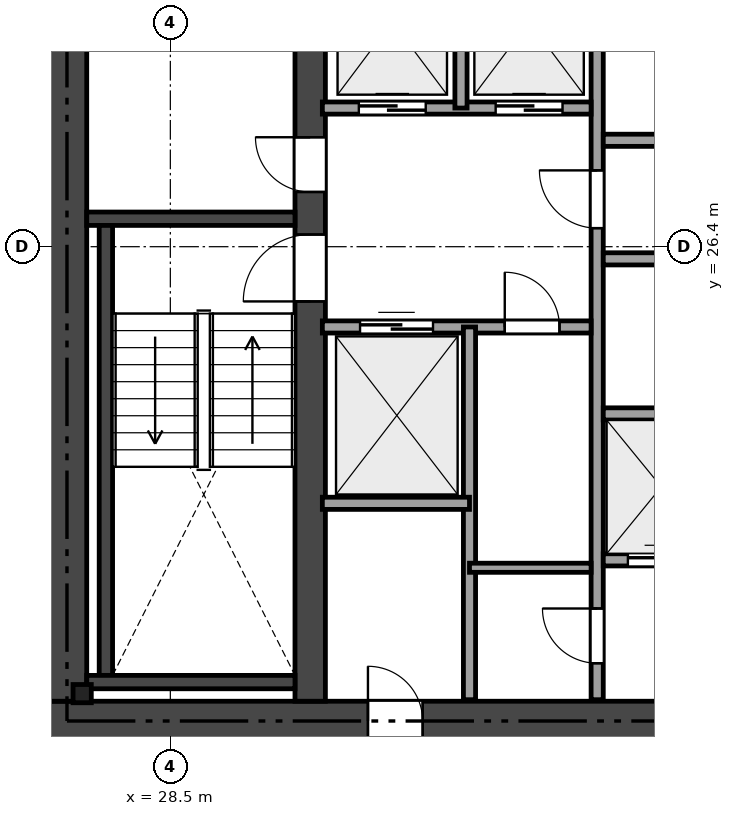
"""IFC4 building model, lengths in metres.
Left out: names, types, materials, properties, quantities, classifications, styles, units other than length and angle.
Written with IfcOpenShell. Run it as: python <this file> out.ifc"""

import sys

from ifc_helpers import new_model, si_unit, direction, frame, frame_2d, origin, origin_2d, place, context, subcontext, project, spatial, rectangle, i_section, extrude, element, fill, save


model = new_model("IFC4")
c1 = context("Model", 3, precision=1e-05, world=origin(), true_north=direction((0.0, 1.0)))
c2 = subcontext(c1, "Body", "Model", "MODEL_VIEW")
j1 = project(units=[si_unit("LENGTHUNIT", "METRE"), si_unit("PLANEANGLEUNIT", "RADIAN")], contexts=[c1])
p1 = place(None, origin())
s1 = spatial("IfcSite", under=j1, at=p1, CompositionType="ELEMENT")
p2 = place(p1, origin())
s2 = spatial("IfcBuilding", under=s1, at=p2, CompositionType="ELEMENT")
p3 = place(p2, frame((0.0, 0.0, 40.8)))
s3 = spatial("IfcBuildingStorey", under=s2, at=p3, CompositionType="ELEMENT", Elevation=40.8)
p4 = place(p3, frame((26.475, 18.6, 0.0), z_axis=(0.0, 0.0, 1.0), x_axis=(1.0, 0.0, 0.0)))
e1 = element("IfcWall", 1, at=p4, inside=s3, PredefinedType="SHEAR", context=c2, shape_type="SweptSolid", body=[
    extrude(rectangle(XDim=21.45, YDim=0.65, at=frame_2d((10.725, 0.0))), origin(), (0.0, 0.0, 1.0), 3.17),
])
p5 = place(p4, frame((12.45, 0.0, 0.0)))
e2 = element("IfcOpeningElement", 2, at=p5, cuts=e1, PredefinedType="OPENING", context=c2, shape_type="SweptSolid", body=[
    extrude(rectangle(XDim=1.15, YDim=2.15, at=frame_2d((0.575, 1.075))), frame((0.0, 0.335, 0.0), z_axis=(0.0, -1.0, 0.0), x_axis=(1.0, 0.0, 0.0)), (0.0, 0.0, 1.0), 0.67),
])
p6 = place(p4, frame((5.275, 0.0, 0.0)))
e3 = element("IfcOpeningElement", 3, at=p6, cuts=e1, PredefinedType="OPENING", context=c2, shape_type="SweptSolid", body=[
    extrude(rectangle(XDim=0.9, YDim=2.1, at=frame_2d((0.45, 1.05))), frame((0.0, 0.335, 0.0), z_axis=(0.0, -1.0, 0.0), x_axis=(1.0, 0.0, 0.0)), (0.0, 0.0, 1.0), 0.67),
])
p7 = place(p3, frame((26.8, 18.925, 0.0), z_axis=(0.0, 0.0, 1.0), x_axis=(0.0, 1.0, 0.0)))
e4 = element("IfcWall", 4, at=p7, inside=s3, PredefinedType="SHEAR", context=c2, shape_type="SweptSolid", body=[
    extrude(rectangle(XDim=14.95, YDim=0.65, at=frame_2d((7.475, 0.0))), origin(), (0.0, 0.0, 1.0), 3.17),
])
p8 = place(p3, frame((30.8, 18.925, 0.0), z_axis=(0.0, 0.0, 1.0), x_axis=(0.0, 1.0, 0.0)))
e5 = element("IfcWall", 5, at=p8, inside=s3, PredefinedType="SHEAR", context=c2, shape_type="SweptSolid", body=[
    extrude(rectangle(XDim=14.95, YDim=0.5, at=frame_2d((7.475, 0.0))), origin(), (0.0, 0.0, 1.0), 3.17),
])
p9 = place(p8, frame((6.575, 0.0, 0.0)))
e6 = element("IfcOpeningElement", 6, at=p9, cuts=e5, PredefinedType="OPENING", context=c2, shape_type="SweptSolid", body=[
    extrude(rectangle(XDim=1.1, YDim=2.15, at=frame_2d((0.55, 1.075))), frame((0.0, 0.26, 0.0), z_axis=(0.0, -1.0, 0.0), x_axis=(1.0, 0.0, 0.0)), (0.0, 0.0, 1.0), 0.52),
])
p10 = place(p8, frame((8.375, 0.0, 0.0)))
e7 = element("IfcOpeningElement", 7, at=p10, cuts=e5, PredefinedType="OPENING", context=c2, shape_type="SweptSolid", body=[
    extrude(rectangle(XDim=0.9, YDim=2.1, at=frame_2d((0.45, 1.05))), frame((0.0, 0.26, 0.0), z_axis=(0.0, -1.0, 0.0), x_axis=(1.0, 0.0, 0.0)), (0.0, 0.0, 1.0), 0.52),
])
p11 = place(p3, frame((27.125, 26.86, 0.0), z_axis=(0.0, 0.0, 1.0), x_axis=(1.0, 0.0, 0.0)))
e8 = element("IfcWall", 8, at=p11, inside=s3, PredefinedType="SHEAR", context=c2, shape_type="SweptSolid", body=[
    extrude(rectangle(XDim=3.425, YDim=0.22, at=frame_2d((1.712, 0.0))), origin(), (0.0, 0.0, 1.0), 3.17),
])
p12 = place(p3, frame((27.44, 19.35, 0.0), z_axis=(0.0, 0.0, 1.0), x_axis=(0.0, 1.0, 0.0)))
e9 = element("IfcWall", 9, at=p12, inside=s3, PredefinedType="SHEAR", context=c2, shape_type="SweptSolid", body=[
    extrude(rectangle(XDim=7.4, YDim=0.22, at=frame_2d((3.7, 0.0))), origin(), (0.0, 0.0, 1.0), 3.17),
])
p13 = place(p3, frame((27.125, 19.24, 0.0), z_axis=(0.0, 0.0, 1.0), x_axis=(1.0, 0.0, 0.0)))
e10 = element("IfcWall", 10, at=p13, inside=s3, PredefinedType="SHEAR", context=c2, shape_type="SweptSolid", body=[
    extrude(rectangle(XDim=3.425, YDim=0.22, at=frame_2d((1.712, 0.0))), origin(), (0.0, 0.0, 1.0), 3.17),
])
p14 = place(p3, frame((27.05, 19.05, 0.0), z_axis=(0.0, 0.0, 1.0), x_axis=(1.0, 0.0, 0.0)))
e11 = element("IfcColumn", 11, at=p14, inside=s3, PredefinedType="PILASTER", context=c2, shape_type="SweptSolid", body=[
    extrude(i_section(OverallWidth=0.3, OverallDepth=0.3, WebThickness=0.011, FlangeThickness=0.019, at=origin_2d()), origin(), (0.0, 0.0, 1.0), 3.17),
])
p15 = place(p3, frame((35.52, 18.95, 0.0), z_axis=(0.0, 0.0, 1.0), x_axis=(0.0, 1.0, 0.0)))
e12 = element("IfcWall", 12, at=p15, inside=s3, PredefinedType="SOLIDWALL", context=c2, shape_type="SweptSolid", body=[
    extrude(rectangle(XDim=14.9, YDim=0.2, at=frame_2d((7.45, 0.0))), origin(), (0.0, 0.0, 1.0), 2.691),
])
p16 = place(p15, frame((7.755, 0.0, 0.0)))
e13 = element("IfcOpeningElement", 13, at=p16, cuts=e12, PredefinedType="OPENING", context=c2, shape_type="SweptSolid", body=[
    extrude(rectangle(XDim=0.95, YDim=2.15, at=frame_2d((0.475, 1.075))), frame((0.0, 0.11, 0.0), z_axis=(0.0, -1.0, 0.0), x_axis=(1.0, 0.0, 0.0)), (0.0, 0.0, 1.0), 0.22),
])
p17 = place(p15, frame((0.6, 0.0, 0.0)))
e14 = element("IfcOpeningElement", 14, at=p17, cuts=e12, PredefinedType="OPENING", context=c2, shape_type="SweptSolid", body=[
    extrude(rectangle(XDim=0.9, YDim=2.1, at=frame_2d((0.45, 1.05))), frame((0.0, 0.11, 0.0), z_axis=(0.0, -1.0, 0.0), x_axis=(1.0, 0.0, 0.0)), (0.0, 0.0, 1.0), 0.22),
])
p18 = place(p3, frame((31.0, 28.68, 0.0), z_axis=(0.0, 0.0, 1.0), x_axis=(1.0, 0.0, 0.0)))
e15 = element("IfcWall", 15, at=p18, inside=s3, PredefinedType="SOLIDWALL", context=c2, shape_type="SweptSolid", body=[
    extrude(rectangle(XDim=4.42, YDim=0.2, at=frame_2d((2.21, 0.0))), origin(), (0.0, 0.0, 1.0), 3.17),
])
p19 = place(p18, frame((0.6, 0.0, 0.0)))
e16 = element("IfcOpeningElement", 16, at=p19, cuts=e15, PredefinedType="OPENING", context=c2, shape_type="SweptSolid", body=[
    extrude(rectangle(XDim=1.1, YDim=2.15, at=frame_2d((0.55, 1.075))), frame((0.0, 0.11, 0.0), z_axis=(0.0, -1.0, 0.0), x_axis=(1.0, 0.0, 0.0)), (0.0, 0.0, 1.0), 0.22),
])
p20 = place(p18, frame((2.85, 0.0, 0.0)))
e17 = element("IfcOpeningElement", 17, at=p20, cuts=e15, PredefinedType="OPENING", context=c2, shape_type="SweptSolid", body=[
    extrude(rectangle(XDim=1.1, YDim=2.15, at=frame_2d((0.55, 1.075))), frame((0.0, 0.11, 0.0), z_axis=(0.0, -1.0, 0.0), x_axis=(1.0, 0.0, 0.0)), (0.0, 0.0, 1.0), 0.22),
])
p21 = place(p3, frame((33.28, 28.68, 0.0), z_axis=(0.0, 0.0, 1.0), x_axis=(0.0, 1.0, 0.0)))
e18 = element("IfcWall", 18, at=p21, inside=s3, PredefinedType="SOLIDWALL", context=c2, shape_type="SweptSolid", body=[
    extrude(rectangle(XDim=2.82, YDim=0.2, at=frame_2d((1.41, 0.0))), origin(), (0.0, 0.0, 1.0), 3.17),
])
p22 = place(p3, frame((31.0, 25.08, 0.0), z_axis=(0.0, 0.0, 1.0), x_axis=(1.0, 0.0, 0.0)))
e19 = element("IfcWall", 19, at=p22, inside=s3, PredefinedType="SOLIDWALL", context=c2, shape_type="SweptSolid", body=[
    extrude(rectangle(XDim=4.42, YDim=0.2, at=frame_2d((2.21, 0.0))), origin(), (0.0, 0.0, 1.0), 3.17),
])
p23 = place(p22, frame((3.0, 0.0, 0.0)))
e20 = element("IfcOpeningElement", 20, at=p23, cuts=e19, PredefinedType="OPENING", context=c2, shape_type="SweptSolid", body=[
    extrude(rectangle(XDim=0.9, YDim=2.1, at=frame_2d((0.45, 1.05))), frame((0.0, 0.11, 0.0), z_axis=(0.0, -1.0, 0.0), x_axis=(1.0, 0.0, 0.0)), (0.0, 0.0, 1.0), 0.22),
])
p24 = place(p22, frame((0.62, 0.0, 0.0)))
e21 = element("IfcOpeningElement", 21, at=p24, cuts=e19, PredefinedType="OPENING", context=c2, shape_type="SweptSolid", body=[
    extrude(rectangle(XDim=1.2, YDim=2.15, at=frame_2d((0.6, 1.075))), frame((0.0, 0.11, 0.0), z_axis=(0.0, -1.0, 0.0), x_axis=(1.0, 0.0, 0.0)), (0.0, 0.0, 1.0), 0.22),
])
p25 = place(p3, frame((33.42, 18.95, 0.0), z_axis=(0.0, 0.0, 1.0), x_axis=(0.0, 1.0, 0.0)))
e22 = element("IfcWall", 22, at=p25, inside=s3, PredefinedType="SOLIDWALL", context=c2, shape_type="SweptSolid", body=[
    extrude(rectangle(XDim=6.13, YDim=0.2, at=frame_2d((3.065, 0.0))), origin(), (0.0, 0.0, 1.0), 2.691),
])
p26 = place(p3, frame((31.0, 22.18, 0.0), z_axis=(0.0, 0.0, 1.0), x_axis=(1.0, 0.0, 0.0)))
e23 = element("IfcWall", 23, at=p26, inside=s3, PredefinedType="SOLIDWALL", context=c2, shape_type="SweptSolid", body=[
    extrude(rectangle(XDim=2.42, YDim=0.2, at=frame_2d((1.21, 0.0))), origin(), (0.0, 0.0, 1.0), 3.17),
])
p27 = place(p3, frame((33.42, 21.12, 0.0), z_axis=(0.0, 0.0, 1.0), x_axis=(1.0, 0.0, 0.0)))
e24 = element("IfcWall", 24, at=p27, inside=s3, PredefinedType="PARTITIONING", context=c2, shape_type="SweptSolid", body=[
    extrude(rectangle(XDim=2.0, YDim=0.15, at=frame_2d((1.0, 0.0))), origin(), (0.0, 0.0, 1.0), 3.17),
])
for number, where, z_axis, x_axis in (
    (25, (35.62, 28.15, 0.0), (0.0, 0.0, 1.0), (1.0, 0.0, 0.0)),
    (26, (35.62, 26.2, 0.0), (0.0, 0.0, 1.0), (1.0, 0.0, 0.0)),
):
    element("IfcWall", number, at=place(p3, frame(where, z_axis=z_axis, x_axis=x_axis)), inside=s3, PredefinedType="SOLIDWALL", context=c2, shape_type="SweptSolid", body=[
        extrude(rectangle(XDim=7.88, YDim=0.2, at=frame_2d((3.94, 0.0))), origin(), (0.0, 0.0, 1.0), 3.17),
    ])
p28 = place(p3, frame((35.62, 23.65, 0.0), z_axis=(0.0, 0.0, 1.0), x_axis=(1.0, 0.0, 0.0)))
e27 = element("IfcWall", 27, at=p28, inside=s3, PredefinedType="SOLIDWALL", context=c2, shape_type="SweptSolid", body=[
    extrude(rectangle(XDim=7.88, YDim=0.2, at=frame_2d((3.94, 0.0))), origin(), (0.0, 0.0, 1.0), 2.691),
])
p29 = place(p3, frame((35.62, 21.25, 0.0), z_axis=(0.0, 0.0, 1.0), x_axis=(1.0, 0.0, 0.0)))
e28 = element("IfcWall", 28, at=p29, inside=s3, PredefinedType="SOLIDWALL", context=c2, shape_type="SweptSolid", body=[
    extrude(rectangle(XDim=7.88, YDim=0.2, at=frame_2d((3.94, 0.0))), origin(), (0.0, 0.0, 1.0), 3.17),
])
p30 = place(p29, frame((0.405, 0.0, 0.0)))
e29 = element("IfcOpeningElement", 29, at=p30, cuts=e28, PredefinedType="OPENING", context=c2, shape_type="SweptSolid", body=[
    extrude(rectangle(XDim=1.1, YDim=2.15, at=frame_2d((0.55, 1.075))), frame((0.0, 0.11, 0.0), z_axis=(0.0, -1.0, 0.0), x_axis=(1.0, 0.0, 0.0)), (0.0, 0.0, 1.0), 0.22),
])
p31 = place(p29, frame((2.355, 0.0, 0.0)))
e30 = element("IfcOpeningElement", 30, at=p31, cuts=e28, PredefinedType="OPENING", context=c2, shape_type="SweptSolid", body=[
    extrude(rectangle(XDim=1.1, YDim=2.15, at=frame_2d((0.55, 1.075))), frame((0.0, 0.11, 0.0), z_axis=(0.0, -1.0, 0.0), x_axis=(1.0, 0.0, 0.0)), (0.0, 0.0, 1.0), 0.22),
])
p32 = place(p29, frame((4.305, 0.0, 0.0)))
e31 = element("IfcOpeningElement", 31, at=p32, cuts=e28, PredefinedType="OPENING", context=c2, shape_type="SweptSolid", body=[
    extrude(rectangle(XDim=1.1, YDim=2.15, at=frame_2d((0.55, 1.075))), frame((0.0, 0.11, 0.0), z_axis=(0.0, -1.0, 0.0), x_axis=(1.0, 0.0, 0.0)), (0.0, 0.0, 1.0), 0.22),
])
p33 = place(p29, frame((6.255, 0.0, 0.0)))
e32 = element("IfcOpeningElement", 32, at=p33, cuts=e28, PredefinedType="OPENING", context=c2, shape_type="SweptSolid", body=[
    extrude(rectangle(XDim=1.1, YDim=2.15, at=frame_2d((0.55, 1.075))), frame((0.0, 0.11, 0.0), z_axis=(0.0, -1.0, 0.0), x_axis=(1.0, 0.0, 0.0)), (0.0, 0.0, 1.0), 0.22),
])
p34 = place(p9, origin())
e33 = element("IfcDoor", 33, at=p34, inside=s3, OperationType="SINGLE_SWING_LEFT", PredefinedType="DOOR", context=c2, shape_type="SweptSolid", body=[
    extrude(rectangle(XDim=1.1, YDim=2.15, at=frame_2d((0.55, 1.075))), frame((0.0, 0.025, 0.0), z_axis=(0.0, -1.0, 0.0), x_axis=(1.0, 0.0, 0.0)), (0.0, 0.0, 1.0), 0.05),
])
fill(e6, e33)
p35 = place(p16, origin())
e34 = element("IfcDoor", 34, at=p35, inside=s3, OperationType="SINGLE_SWING_RIGHT", PredefinedType="DOOR", context=c2, shape_type="SweptSolid", body=[
    extrude(rectangle(XDim=0.95, YDim=2.15, at=frame_2d((0.475, 1.075))), frame((0.0, 0.025, 0.0), z_axis=(0.0, -1.0, 0.0), x_axis=(1.0, 0.0, 0.0)), (0.0, 0.0, 1.0), 0.05),
])
fill(e13, e34)
p36 = place(p10, origin())
e35 = element("IfcDoor", 35, at=p36, inside=s3, OperationType="SINGLE_SWING_RIGHT", PredefinedType="DOOR", context=c2, shape_type="SweptSolid", body=[
    extrude(rectangle(XDim=0.9, YDim=2.1, at=frame_2d((0.45, 1.05))), frame((0.0, 0.025, 0.0), z_axis=(0.0, -1.0, 0.0), x_axis=(1.0, 0.0, 0.0)), (0.0, 0.0, 1.0), 0.05),
])
fill(e7, e35)
p37 = place(p6, origin())
e36 = element("IfcDoor", 36, at=p37, inside=s3, OperationType="SINGLE_SWING_LEFT", PredefinedType="DOOR", context=c2, shape_type="SweptSolid", body=[
    extrude(rectangle(XDim=0.9, YDim=2.1, at=frame_2d((0.45, 1.05))), frame((0.0, 0.025, 0.0), z_axis=(0.0, -1.0, 0.0), x_axis=(1.0, 0.0, 0.0)), (0.0, 0.0, 1.0), 0.05),
])
fill(e3, e36)
p38 = place(p17, origin())
e37 = element("IfcDoor", 37, at=p38, inside=s3, OperationType="SINGLE_SWING_RIGHT", PredefinedType="DOOR", context=c2, shape_type="SweptSolid", body=[
    extrude(rectangle(XDim=0.9, YDim=2.1, at=frame_2d((0.45, 1.05))), frame((0.0, 0.025, 0.0), z_axis=(0.0, -1.0, 0.0), x_axis=(1.0, 0.0, 0.0)), (0.0, 0.0, 1.0), 0.05),
])
fill(e14, e37)
p39 = place(p23, origin())
e38 = element("IfcDoor", 38, at=p39, inside=s3, OperationType="SINGLE_SWING_LEFT", PredefinedType="DOOR", context=c2, shape_type="SweptSolid", body=[
    extrude(rectangle(XDim=0.9, YDim=2.1, at=frame_2d((0.45, 1.05))), frame((0.0, 0.025, 0.0), z_axis=(0.0, -1.0, 0.0), x_axis=(1.0, 0.0, 0.0)), (0.0, 0.0, 1.0), 0.05),
])
fill(e20, e38)
p40 = place(p19, origin())
e39 = element("IfcDoor", 39, at=p40, inside=s3, OperationType="SLIDING_TO_LEFT", PredefinedType="DOOR", context=c2, shape_type="SweptSolid", body=[
    extrude(rectangle(XDim=1.1, YDim=2.15, at=frame_2d((0.55, 1.075))), frame((0.0, 0.025, 0.0), z_axis=(0.0, -1.0, 0.0), x_axis=(1.0, 0.0, 0.0)), (0.0, 0.0, 1.0), 0.05),
])
fill(e16, e39)
p41 = place(p20, origin())
e40 = element("IfcDoor", 40, at=p41, inside=s3, OperationType="SLIDING_TO_LEFT", PredefinedType="DOOR", context=c2, shape_type="SweptSolid", body=[
    extrude(rectangle(XDim=1.1, YDim=2.15, at=frame_2d((0.55, 1.075))), frame((0.0, 0.025, 0.0), z_axis=(0.0, -1.0, 0.0), x_axis=(1.0, 0.0, 0.0)), (0.0, 0.0, 1.0), 0.05),
])
fill(e17, e40)
p42 = place(p24, origin())
e41 = element("IfcDoor", 41, at=p42, inside=s3, OperationType="SLIDING_TO_LEFT", PredefinedType="DOOR", context=c2, shape_type="SweptSolid", body=[
    extrude(rectangle(XDim=1.2, YDim=2.15, at=frame_2d((0.6, 1.075))), frame((0.0, 0.025, 0.0), z_axis=(0.0, -1.0, 0.0), x_axis=(1.0, 0.0, 0.0)), (0.0, 0.0, 1.0), 0.05),
])
fill(e21, e41)
p43 = place(p30, origin())
e42 = element("IfcDoor", 42, at=p43, inside=s3, OperationType="SLIDING_TO_LEFT", PredefinedType="DOOR", context=c2, shape_type="SweptSolid", body=[
    extrude(rectangle(XDim=1.1, YDim=2.15, at=frame_2d((0.55, 1.075))), frame((0.0, 0.025, 0.0), z_axis=(0.0, -1.0, 0.0), x_axis=(1.0, 0.0, 0.0)), (0.0, 0.0, 1.0), 0.05),
])
fill(e29, e42)
save(model, sys.argv[1])
